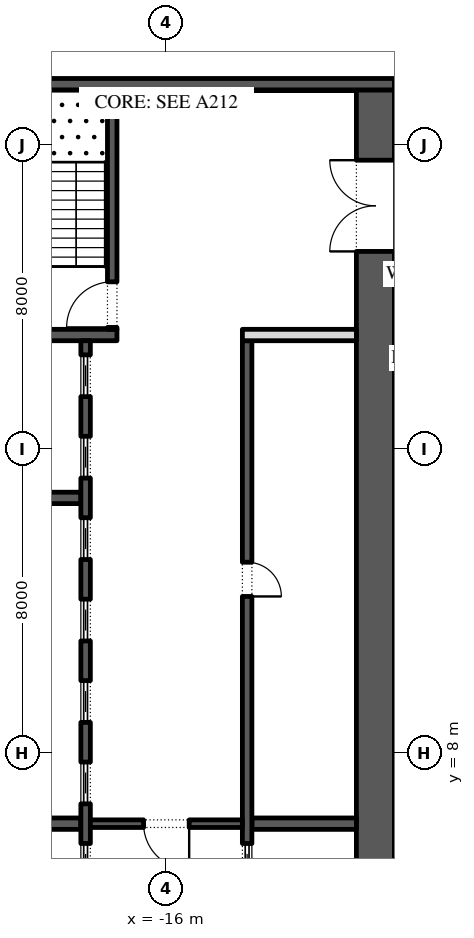
"""IFC4 building model, lengths in metres.
Left out: names, types, materials, properties, quantities, classifications, styles, units other than length and angle.
Written with IfcOpenShell. Run it as: python <this file> out.ifc"""

import sys

from ifc_helpers import new_model, si_unit, direction, frame, frame_2d, origin, place, context, subcontext, project, spatial, rectangle, extrude, element, fill, save


model = new_model("IFC4")
c1 = context("Model", 3, precision=1e-05, world=origin(), true_north=direction((0.0, 1.0)))
c2 = subcontext(c1, "Body", "Model", "MODEL_VIEW")
j1 = project(units=[si_unit("LENGTHUNIT", "METRE"), si_unit("PLANEANGLEUNIT", "RADIAN")], contexts=[c1])
p1 = place(None, origin())
s1 = spatial("IfcSite", under=j1, at=p1, CompositionType="ELEMENT")
p2 = place(p1, origin())
s2 = spatial("IfcBuilding", under=s1, at=p2, CompositionType="ELEMENT")
p3 = place(p2, frame((0.0, 0.0, 48.0)))
s3 = spatial("IfcBuildingStorey", under=s2, at=p3, CompositionType="ELEMENT", Elevation=48.0)
p4 = place(p3, frame((-10.5, -2.45, 0.0), z_axis=(0.0, 0.0, 1.0), x_axis=(0.0, 1.0, 0.0)))
e1 = element("IfcWall", 1, at=p4, inside=s3, PredefinedType="SHEAR", context=c2, shape_type="SweptSolid", body=[
    extrude(rectangle(XDim=27.9, YDim=1.0, at=frame_2d((13.95, 0.0))), origin(), (0.0, 0.0, 1.0), 4.0),
])
p5 = place(p4, frame((23.65, 0.0, 0.0)))
e2 = element("IfcOpeningElement", 2, at=p5, cuts=e1, PredefinedType="OPENING", context=c2, shape_type="SweptSolid", body=[
    extrude(rectangle(XDim=2.4, YDim=2.1, at=frame_2d((1.2, 1.05))), frame((0.0, 0.51, 0.0), z_axis=(0.0, -1.0, 0.0), x_axis=(1.0, 0.0, 0.0)), (0.0, 0.0, 1.0), 1.02),
])
p6 = place(p4, frame((1.087, 0.0, 0.0)))
e3 = element("IfcOpeningElement", 3, at=p6, cuts=e1, PredefinedType="OPENING", context=c2, shape_type="SweptSolid", body=[
    extrude(rectangle(XDim=0.9, YDim=2.1, at=frame_2d((0.45, 1.05))), frame((0.0, 0.51, 0.0), z_axis=(0.0, -1.0, 0.0), x_axis=(1.0, 0.0, 0.0)), (0.0, 0.0, 1.0), 1.02),
])
p7 = place(p4, frame((4.312, 0.0, 0.0)))
e4 = element("IfcOpeningElement", 4, at=p7, cuts=e1, PredefinedType="OPENING", context=c2, shape_type="SweptSolid", body=[
    extrude(rectangle(XDim=0.9, YDim=2.1, at=frame_2d((0.45, 1.05))), frame((0.0, 0.51, 0.0), z_axis=(0.0, -1.0, 0.0), x_axis=(1.0, 0.0, 0.0)), (0.0, 0.0, 1.0), 1.02),
])
p8 = place(p3, frame((-22.0, 25.6, 0.0), z_axis=(0.0, 0.0, 1.0), x_axis=(1.0, 0.0, 0.0)))
e5 = element("IfcWall", 5, at=p8, inside=s3, PredefinedType="SHEAR", context=c2, shape_type="SweptSolid", body=[
    extrude(rectangle(XDim=12.0, YDim=0.3, at=frame_2d((6.0, 0.0))), origin(), (0.0, 0.0, 1.0), 4.0),
])
p9 = place(p3, frame((-21.0, 19.0, 0.0), z_axis=(0.0, 0.0, 1.0), x_axis=(1.0, 0.0, 0.0)))
e6 = element("IfcWall", 6, at=p9, inside=s3, PredefinedType="SHEAR", context=c2, shape_type="SweptSolid", body=[
    extrude(rectangle(XDim=3.7, YDim=0.3, at=frame_2d((1.85, 0.0))), origin(), (0.0, 0.0, 1.0), 4.0),
])
p10 = place(p3, frame((-17.425, 19.15, 0.0), z_axis=(0.0, 0.0, 1.0), x_axis=(0.0, 1.0, 0.0)))
e7 = element("IfcWall", 7, at=p10, inside=s3, PredefinedType="SHEAR", context=c2, shape_type="SweptSolid", body=[
    extrude(rectangle(XDim=6.3, YDim=0.25, at=frame_2d((3.15, 0.0))), origin(), (0.0, 0.0, 1.0), 4.0),
])
p11 = place(p10, frame((0.05, 0.0, 0.0)))
e8 = element("IfcOpeningElement", 8, at=p11, cuts=e7, PredefinedType="OPENING", context=c2, shape_type="SweptSolid", body=[
    extrude(rectangle(XDim=1.2, YDim=2.1, at=frame_2d((0.6, 1.05))), frame((0.0, 0.135, 0.0), z_axis=(0.0, -1.0, 0.0), x_axis=(1.0, 0.0, 0.0)), (0.0, 0.0, 1.0), 0.27),
])
for number, where, z_axis, x_axis in (
    (9, (-21.0, 6.143, 0.0), (0.0, 0.0, 1.0), (1.0, 0.0, 0.0)),
    (10, (-21.0, 14.714, 0.0), (0.0, 0.0, 1.0), (1.0, 0.0, 0.0)),
):
    element("IfcWall", number, at=place(p3, frame(where, z_axis=z_axis, x_axis=x_axis)), inside=s3, PredefinedType="SHEAR", context=c2, shape_type="SweptSolid", body=[
        extrude(rectangle(XDim=2.75, YDim=0.3, at=frame_2d((1.375, 0.0))), origin(), (0.0, 0.0, 1.0), 4.0),
    ])
p12 = place(p3, frame((-18.125, 4.15, 0.0), z_axis=(0.0, 0.0, 1.0), x_axis=(0.0, 1.0, 0.0)))
e11 = element("IfcWall", 11, at=p12, inside=s3, PredefinedType="SHEAR", context=c2, shape_type="SweptSolid", body=[
    extrude(rectangle(XDim=14.7, YDim=0.25, at=frame_2d((7.35, 0.0))), origin(), (0.0, 0.0, 1.0), 4.0),
])
p13 = place(p12, frame((0.371, 0.0, 0.0)))
e12 = element("IfcOpeningElement", 12, at=p13, cuts=e11, PredefinedType="OPENING", context=c2, shape_type="SweptSolid", body=[
    extrude(rectangle(XDim=1.1, YDim=2.1, at=frame_2d((0.55, 1.05))), frame((0.0, 0.135, 0.0), z_axis=(0.0, -1.0, 0.0), x_axis=(1.0, 0.0, 0.0)), (0.0, 0.0, 1.0), 0.27),
])
p14 = place(p12, frame((2.514, 0.0, 0.0)))
e13 = element("IfcOpeningElement", 13, at=p14, cuts=e11, PredefinedType="OPENING", context=c2, shape_type="SweptSolid", body=[
    extrude(rectangle(XDim=1.1, YDim=2.1, at=frame_2d((0.55, 1.05))), frame((0.0, 0.135, 0.0), z_axis=(0.0, -1.0, 0.0), x_axis=(1.0, 0.0, 0.0)), (0.0, 0.0, 1.0), 0.27),
])
p15 = place(p12, frame((4.657, 0.0, 0.0)))
e14 = element("IfcOpeningElement", 14, at=p15, cuts=e11, PredefinedType="OPENING", context=c2, shape_type="SweptSolid", body=[
    extrude(rectangle(XDim=1.1, YDim=2.1, at=frame_2d((0.55, 1.05))), frame((0.0, 0.135, 0.0), z_axis=(0.0, -1.0, 0.0), x_axis=(1.0, 0.0, 0.0)), (0.0, 0.0, 1.0), 0.27),
])
p16 = place(p12, frame((6.8, 0.0, 0.0)))
e15 = element("IfcOpeningElement", 15, at=p16, cuts=e11, PredefinedType="OPENING", context=c2, shape_type="SweptSolid", body=[
    extrude(rectangle(XDim=1.1, YDim=2.1, at=frame_2d((0.55, 1.05))), frame((0.0, 0.135, 0.0), z_axis=(0.0, -1.0, 0.0), x_axis=(1.0, 0.0, 0.0)), (0.0, 0.0, 1.0), 0.27),
])
p17 = place(p12, frame((8.943, 0.0, 0.0)))
e16 = element("IfcOpeningElement", 16, at=p17, cuts=e11, PredefinedType="OPENING", context=c2, shape_type="SweptSolid", body=[
    extrude(rectangle(XDim=1.1, YDim=2.1, at=frame_2d((0.55, 1.05))), frame((0.0, 0.135, 0.0), z_axis=(0.0, -1.0, 0.0), x_axis=(1.0, 0.0, 0.0)), (0.0, 0.0, 1.0), 0.27),
])
p18 = place(p12, frame((11.086, 0.0, 0.0)))
e17 = element("IfcOpeningElement", 17, at=p18, cuts=e11, PredefinedType="OPENING", context=c2, shape_type="SweptSolid", body=[
    extrude(rectangle(XDim=1.1, YDim=2.1, at=frame_2d((0.55, 1.05))), frame((0.0, 0.135, 0.0), z_axis=(0.0, -1.0, 0.0), x_axis=(1.0, 0.0, 0.0)), (0.0, 0.0, 1.0), 0.27),
])
p19 = place(p12, frame((13.229, 0.0, 0.0)))
e18 = element("IfcOpeningElement", 18, at=p19, cuts=e11, PredefinedType="OPENING", context=c2, shape_type="SweptSolid", body=[
    extrude(rectangle(XDim=1.1, YDim=2.1, at=frame_2d((0.55, 1.05))), frame((0.0, 0.135, 0.0), z_axis=(0.0, -1.0, 0.0), x_axis=(1.0, 0.0, 0.0)), (0.0, 0.0, 1.0), 0.27),
])
p20 = place(p3, frame((-13.75, 6.143, 0.0), z_axis=(0.0, 0.0, 1.0), x_axis=(1.0, 0.0, 0.0)))
e19 = element("IfcWall", 19, at=p20, inside=s3, PredefinedType="SHEAR", context=c2, shape_type="SweptSolid", body=[
    extrude(rectangle(XDim=2.75, YDim=0.3, at=frame_2d((1.375, 0.0))), origin(), (0.0, 0.0, 1.0), 4.0),
])
p21 = place(p3, frame((-13.875, -2.45, 0.0), z_axis=(0.0, 0.0, 1.0), x_axis=(0.0, 1.0, 0.0)))
e20 = element("IfcWall", 20, at=p21, inside=s3, PredefinedType="SHEAR", context=c2, shape_type="SweptSolid", body=[
    extrude(rectangle(XDim=21.3, YDim=0.25, at=frame_2d((10.65, 0.0))), origin(), (0.0, 0.0, 1.0), 4.0),
])
p22 = place(p21, frame((14.571, 0.0, 0.0)))
e21 = element("IfcOpeningElement", 21, at=p22, cuts=e20, PredefinedType="OPENING", context=c2, shape_type="SweptSolid", body=[
    extrude(rectangle(XDim=0.9, YDim=2.1, at=frame_2d((0.45, 1.05))), frame((0.0, 0.135, 0.0), z_axis=(0.0, -1.0, 0.0), x_axis=(1.0, 0.0, 0.0)), (0.0, 0.0, 1.0), 0.27),
])
p23 = place(p21, frame((6.971, 0.0, 0.0)))
e22 = element("IfcOpeningElement", 22, at=p23, cuts=e20, PredefinedType="OPENING", context=c2, shape_type="SweptSolid", body=[
    extrude(rectangle(XDim=1.1, YDim=2.1, at=frame_2d((0.55, 1.05))), frame((0.0, 0.135, 0.0), z_axis=(0.0, -1.0, 0.0), x_axis=(1.0, 0.0, 0.0)), (0.0, 0.0, 1.0), 0.27),
])
p24 = place(p3, frame((-14.0, 19.0, 0.0), z_axis=(0.0, 0.0, 1.0), x_axis=(1.0, 0.0, 0.0)))
e23 = element("IfcWall", 23, at=p24, inside=s3, PredefinedType="PARTITIONING", context=c2, shape_type="SweptSolid", body=[
    extrude(rectangle(XDim=3.0, YDim=0.3, at=frame_2d((1.5, 0.0))), origin(), (0.0, 0.0, 1.0), 4.0),
])
p25 = place(p3, frame((-18.0, 6.143, 0.0), z_axis=(0.0, 0.0, 1.0), x_axis=(1.0, 0.0, 0.0)))
e24 = element("IfcWall", 24, at=p25, inside=s3, PredefinedType="SHEAR", context=c2, shape_type="SweptSolid", body=[
    extrude(rectangle(XDim=4.0, YDim=0.2, at=frame_2d((2.0, 0.0))), origin(), (0.0, 0.0, 1.0), 4.0),
])
p26 = place(p25, frame((1.4, 0.0, 0.0)))
e25 = element("IfcOpeningElement", 25, at=p26, cuts=e24, PredefinedType="OPENING", context=c2, shape_type="SweptSolid", body=[
    extrude(rectangle(XDim=1.2, YDim=2.1, at=frame_2d((0.6, 1.05))), frame((0.0, 0.11, 0.0), z_axis=(0.0, -1.0, 0.0), x_axis=(1.0, 0.0, 0.0)), (0.0, 0.0, 1.0), 0.22),
])
p27 = place(p3, frame((-10.0, 19.0, 0.0), z_axis=(0.0, 0.0, 1.0), x_axis=(1.0, 0.0, 0.0)))
e26 = element("IfcWall", 26, at=p27, inside=s3, PredefinedType="PARTITIONING", context=c2, shape_type="SweptSolid", body=[
    extrude(rectangle(XDim=1.515, YDim=0.15, at=frame_2d((0.757, 0.0))), origin(), (0.0, 0.0, 1.0), 4.0),
])
p28 = place(p27, frame((0.258, 0.0, 0.0)))
e27 = element("IfcOpeningElement", 27, at=p28, cuts=e26, PredefinedType="OPENING", context=c2, shape_type="SweptSolid", body=[
    extrude(rectangle(XDim=1.0, YDim=2.1, at=frame_2d((0.5, 1.05))), frame((0.0, 0.085, 0.0), z_axis=(0.0, -1.0, 0.0), x_axis=(1.0, 0.0, 0.0)), (0.0, 0.0, 1.0), 0.17),
])
p29 = place(p13, origin())
e28 = element("IfcDoor", 28, at=p29, inside=s3, OperationType="SLIDING_TO_LEFT", PredefinedType="DOOR", context=c2, shape_type="SweptSolid", body=[
    extrude(rectangle(XDim=1.1, YDim=2.1, at=frame_2d((0.55, 1.05))), frame((0.0, 0.025, 0.0), z_axis=(0.0, -1.0, 0.0), x_axis=(1.0, 0.0, 0.0)), (0.0, 0.0, 1.0), 0.05),
])
fill(e12, e28)
p30 = place(p14, origin())
e29 = element("IfcDoor", 29, at=p30, inside=s3, OperationType="SLIDING_TO_LEFT", PredefinedType="DOOR", context=c2, shape_type="SweptSolid", body=[
    extrude(rectangle(XDim=1.1, YDim=2.1, at=frame_2d((0.55, 1.05))), frame((0.0, 0.025, 0.0), z_axis=(0.0, -1.0, 0.0), x_axis=(1.0, 0.0, 0.0)), (0.0, 0.0, 1.0), 0.05),
])
fill(e13, e29)
p31 = place(p15, origin())
e30 = element("IfcDoor", 30, at=p31, inside=s3, OperationType="SLIDING_TO_LEFT", PredefinedType="DOOR", context=c2, shape_type="SweptSolid", body=[
    extrude(rectangle(XDim=1.1, YDim=2.1, at=frame_2d((0.55, 1.05))), frame((0.0, 0.025, 0.0), z_axis=(0.0, -1.0, 0.0), x_axis=(1.0, 0.0, 0.0)), (0.0, 0.0, 1.0), 0.05),
])
fill(e14, e30)
p32 = place(p16, origin())
e31 = element("IfcDoor", 31, at=p32, inside=s3, OperationType="SLIDING_TO_LEFT", PredefinedType="DOOR", context=c2, shape_type="SweptSolid", body=[
    extrude(rectangle(XDim=1.1, YDim=2.1, at=frame_2d((0.55, 1.05))), frame((0.0, 0.025, 0.0), z_axis=(0.0, -1.0, 0.0), x_axis=(1.0, 0.0, 0.0)), (0.0, 0.0, 1.0), 0.05),
])
fill(e15, e31)
p33 = place(p17, origin())
e32 = element("IfcDoor", 32, at=p33, inside=s3, OperationType="SLIDING_TO_LEFT", PredefinedType="DOOR", context=c2, shape_type="SweptSolid", body=[
    extrude(rectangle(XDim=1.1, YDim=2.1, at=frame_2d((0.55, 1.05))), frame((0.0, 0.025, 0.0), z_axis=(0.0, -1.0, 0.0), x_axis=(1.0, 0.0, 0.0)), (0.0, 0.0, 1.0), 0.05),
])
fill(e16, e32)
p34 = place(p18, origin())
e33 = element("IfcDoor", 33, at=p34, inside=s3, OperationType="SLIDING_TO_LEFT", PredefinedType="DOOR", context=c2, shape_type="SweptSolid", body=[
    extrude(rectangle(XDim=1.1, YDim=2.1, at=frame_2d((0.55, 1.05))), frame((0.0, 0.025, 0.0), z_axis=(0.0, -1.0, 0.0), x_axis=(1.0, 0.0, 0.0)), (0.0, 0.0, 1.0), 0.05),
])
fill(e17, e33)
p35 = place(p19, origin())
e34 = element("IfcDoor", 34, at=p35, inside=s3, OperationType="SLIDING_TO_LEFT", PredefinedType="DOOR", context=c2, shape_type="SweptSolid", body=[
    extrude(rectangle(XDim=1.1, YDim=2.1, at=frame_2d((0.55, 1.05))), frame((0.0, 0.025, 0.0), z_axis=(0.0, -1.0, 0.0), x_axis=(1.0, 0.0, 0.0)), (0.0, 0.0, 1.0), 0.05),
])
fill(e18, e34)
p36 = place(p22, frame((0.9, -0.2, 0.0), z_axis=(0.0, 0.0, 1.0), x_axis=(-1.0, 0.0, 0.0)))
e35 = element("IfcDoor", 35, at=p36, inside=s3, OperationType="SINGLE_SWING_LEFT", PredefinedType="DOOR", context=c2, shape_type="SweptSolid", body=[
    extrude(rectangle(XDim=0.9, YDim=2.1, at=frame_2d((0.45, 1.05))), frame((0.0, -0.075, 0.0), z_axis=(0.0, -1.0, 0.0), x_axis=(1.0, 0.0, 0.0)), (0.0, 0.0, 1.0), 0.05),
])
fill(e21, e35)
p37 = place(p23, origin())
e36 = element("IfcDoor", 36, at=p37, inside=s3, OperationType="SLIDING_TO_LEFT", PredefinedType="DOOR", context=c2, shape_type="SweptSolid", body=[
    extrude(rectangle(XDim=1.1, YDim=2.1, at=frame_2d((0.55, 1.05))), frame((0.0, 0.025, 0.0), z_axis=(0.0, -1.0, 0.0), x_axis=(1.0, 0.0, 0.0)), (0.0, 0.0, 1.0), 0.05),
])
fill(e22, e36)
p38 = place(p26, frame((1.2, 0.0, 0.0), z_axis=(0.0, 0.0, 1.0), x_axis=(-1.0, 0.0, 0.0)))
e37 = element("IfcDoor", 37, at=p38, inside=s3, OperationType="SINGLE_SWING_RIGHT", PredefinedType="DOOR", context=c2, shape_type="SweptSolid", body=[
    extrude(rectangle(XDim=1.2, YDim=2.1, at=frame_2d((0.6, 1.05))), frame((0.0, 0.025, 0.0), z_axis=(0.0, -1.0, 0.0), x_axis=(1.0, 0.0, 0.0)), (0.0, 0.0, 1.0), 0.05),
])
fill(e25, e37)
p39 = place(p5, origin())
e38 = element("IfcDoor", 38, at=p39, inside=s3, OperationType="DOUBLE_DOOR_SINGLE_SWING", PredefinedType="DOOR", context=c2, shape_type="SweptSolid", body=[
    extrude(rectangle(XDim=2.4, YDim=2.1, at=frame_2d((1.2, 1.05))), frame((0.0, 0.025, 0.0), z_axis=(0.0, -1.0, 0.0), x_axis=(1.0, 0.0, 0.0)), (0.0, 0.0, 1.0), 0.05),
])
fill(e2, e38)
p40 = place(p11, origin())
e39 = element("IfcDoor", 39, at=p40, inside=s3, OperationType="SINGLE_SWING_RIGHT", PredefinedType="DOOR", context=c2, shape_type="SweptSolid", body=[
    extrude(rectangle(XDim=1.2, YDim=2.1, at=frame_2d((0.6, 1.05))), frame((0.0, 0.025, 0.0), z_axis=(0.0, -1.0, 0.0), x_axis=(1.0, 0.0, 0.0)), (0.0, 0.0, 1.0), 0.05),
])
fill(e8, e39)
save(model, sys.argv[1])
